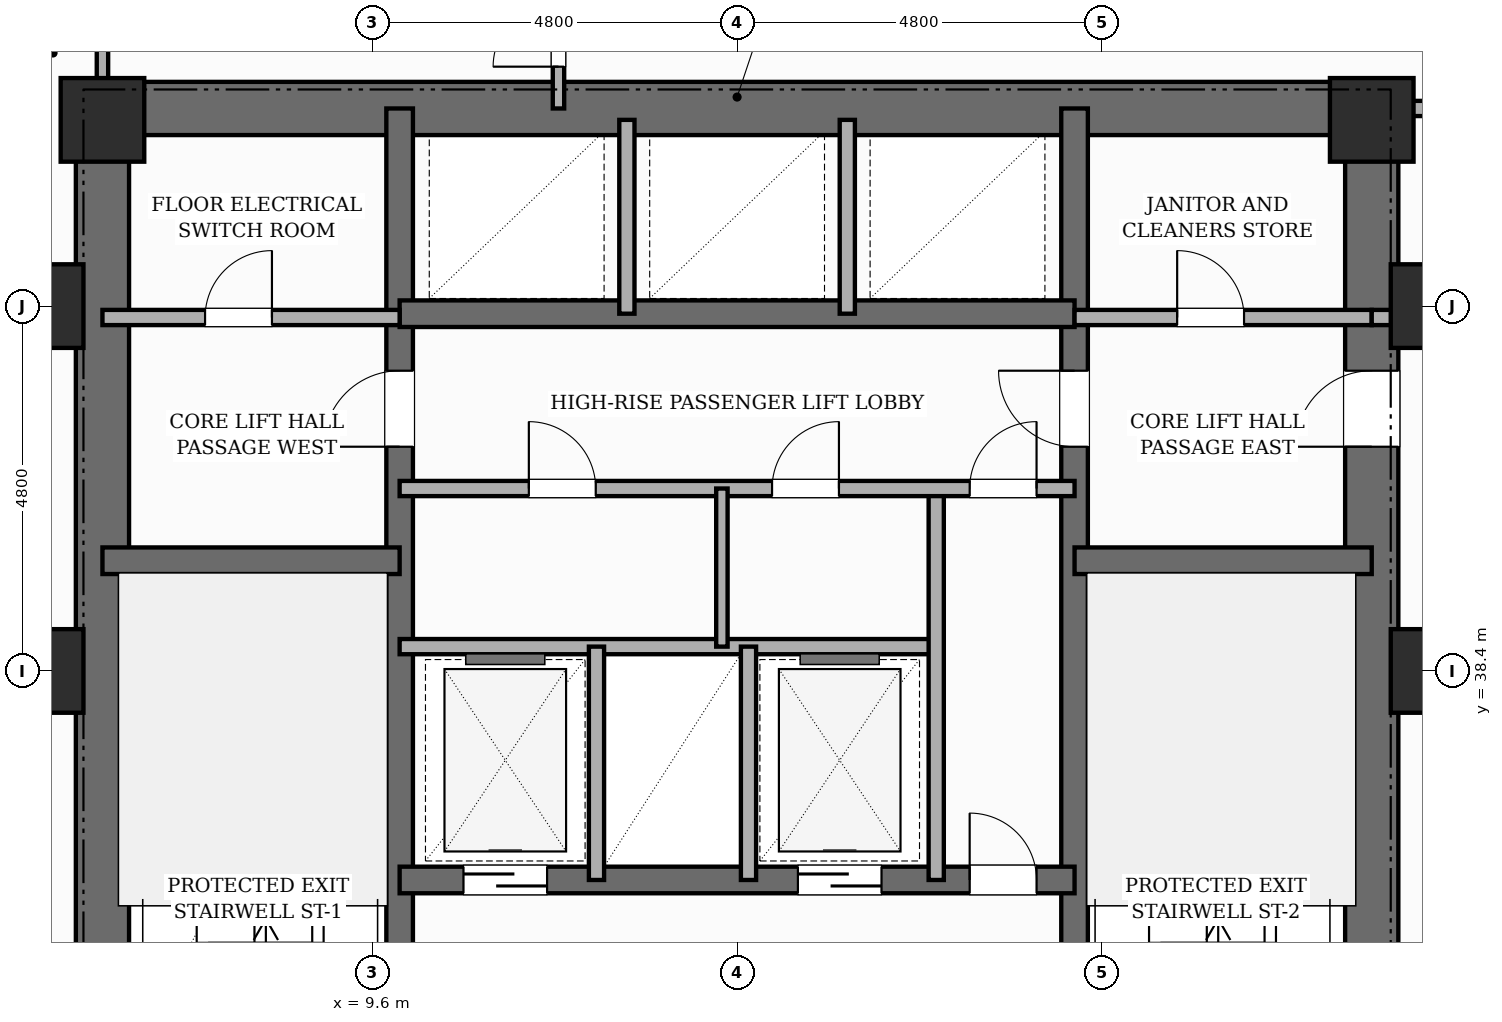
"""IFC4 building model, lengths in metres.
Left out: names, types, materials, properties, quantities, classifications, styles, units other than length and angle.
Written with IfcOpenShell. Run it as: python <this file> out.ifc"""

import sys

from ifc_helpers import new_model, si_unit, direction, frame, frame_2d, origin, origin_2d, place, context, subcontext, project, spatial, rectangle, extrude, element, fill, save


model = new_model("IFC4")
c1 = context("Model", 3, precision=1e-05, world=origin(), true_north=direction((0.0, 1.0)))
c2 = subcontext(c1, "Body", "Model", "MODEL_VIEW")
j1 = project(units=[si_unit("LENGTHUNIT", "METRE"), si_unit("PLANEANGLEUNIT", "RADIAN")], contexts=[c1])
p1 = place(None, origin())
s1 = spatial("IfcSite", under=j1, at=p1, CompositionType="ELEMENT")
p2 = place(p1, origin())
s2 = spatial("IfcBuilding", under=s1, at=p2, CompositionType="ELEMENT")
p3 = place(p2, frame((0.0, 0.0, 35.8)))
s3 = spatial("IfcBuildingStorey", under=s2, at=p3, CompositionType="ELEMENT", Elevation=35.8)
p4 = place(p3, frame((6.05, 30.55, 0.0), z_axis=(0.0, 0.0, 1.0), x_axis=(0.0, 1.0, 0.0)))
e1 = element("IfcWall", 1, at=p4, inside=s3, PredefinedType="SHEAR", context=c2, shape_type="SweptSolid", body=[
    extrude(rectangle(XDim=15.6, YDim=0.7, at=frame_2d((7.8, 0.0))), origin(), (0.0, 0.0, 1.0), 3.6),
])
p5 = place(p3, frame((22.75, 30.55, 0.0), z_axis=(0.0, 0.0, 1.0), x_axis=(0.0, 1.0, 0.0)))
e2 = element("IfcWall", 2, at=p5, inside=s3, PredefinedType="SHEAR", context=c2, shape_type="SweptSolid", body=[
    extrude(rectangle(XDim=15.6, YDim=0.7, at=frame_2d((7.8, 0.0))), origin(), (0.0, 0.0, 1.0), 3.6),
])
p6 = place(p5, frame((10.8, 0.0, 0.0)))
e3 = element("IfcOpeningElement", 3, at=p6, cuts=e2, PredefinedType="OPENING", context=c2, shape_type="SweptSolid", body=[
    extrude(rectangle(XDim=1.0, YDim=2.15, at=frame_2d((0.5, 1.075))), frame((0.0, 0.36, 0.0), z_axis=(0.0, -1.0, 0.0), x_axis=(1.0, 0.0, 0.0)), (0.0, 0.0, 1.0), 0.72),
])
p7 = place(p3, frame((6.05, 45.8, 0.0), z_axis=(0.0, 0.0, 1.0), x_axis=(1.0, 0.0, 0.0)))
e4 = element("IfcWall", 4, at=p7, inside=s3, PredefinedType="SHEAR", context=c2, shape_type="SweptSolid", body=[
    extrude(rectangle(XDim=16.7, YDim=0.7, at=frame_2d((8.35, 0.0))), origin(), (0.0, 0.0, 1.0), 3.6),
])
p8 = place(p3, frame((9.96, 30.9, 0.0), z_axis=(0.0, 0.0, 1.0), x_axis=(0.0, 1.0, 0.0)))
e5 = element("IfcWall", 5, at=p8, inside=s3, PredefinedType="SHEAR", context=c2, shape_type="SweptSolid", body=[
    extrude(rectangle(XDim=14.9, YDim=0.35, at=frame_2d((7.45, 0.0))), origin(), (0.0, 0.0, 1.0), 3.6),
])
p9 = place(p8, frame((0.65, 0.0, 0.0)))
e6 = element("IfcOpeningElement", 6, at=p9, cuts=e5, PredefinedType="OPENING", context=c2, shape_type="SweptSolid", body=[
    extrude(rectangle(XDim=0.95, YDim=2.1, at=frame_2d((0.475, 1.05))), frame((0.0, 0.185, 0.0), z_axis=(0.0, -1.0, 0.0), x_axis=(1.0, 0.0, 0.0)), (0.0, 0.0, 1.0), 0.37),
])
p10 = place(p8, frame((10.45, 0.0, 0.0)))
e7 = element("IfcOpeningElement", 7, at=p10, cuts=e5, PredefinedType="OPENING", context=c2, shape_type="SweptSolid", body=[
    extrude(rectangle(XDim=1.0, YDim=2.15, at=frame_2d((0.5, 1.075))), frame((0.0, 0.185, 0.0), z_axis=(0.0, -1.0, 0.0), x_axis=(1.0, 0.0, 0.0)), (0.0, 0.0, 1.0), 0.37),
])
p11 = place(p3, frame((18.84, 30.9, 0.0), z_axis=(0.0, 0.0, 1.0), x_axis=(0.0, 1.0, 0.0)))
e8 = element("IfcWall", 8, at=p11, inside=s3, PredefinedType="SHEAR", context=c2, shape_type="SweptSolid", body=[
    extrude(rectangle(XDim=14.9, YDim=0.35, at=frame_2d((7.45, 0.0))), origin(), (0.0, 0.0, 1.0), 3.6),
])
p12 = place(p11, frame((0.65, 0.0, 0.0)))
e9 = element("IfcOpeningElement", 9, at=p12, cuts=e8, PredefinedType="OPENING", context=c2, shape_type="SweptSolid", body=[
    extrude(rectangle(XDim=0.95, YDim=2.1, at=frame_2d((0.475, 1.05))), frame((0.0, 0.185, 0.0), z_axis=(0.0, -1.0, 0.0), x_axis=(1.0, 0.0, 0.0)), (0.0, 0.0, 1.0), 0.37),
])
p13 = place(p11, frame((10.45, 0.0, 0.0)))
e10 = element("IfcOpeningElement", 10, at=p13, cuts=e8, PredefinedType="OPENING", context=c2, shape_type="SweptSolid", body=[
    extrude(rectangle(XDim=1.0, YDim=2.15, at=frame_2d((0.5, 1.075))), frame((0.0, 0.185, 0.0), z_axis=(0.0, -1.0, 0.0), x_axis=(1.0, 0.0, 0.0)), (0.0, 0.0, 1.0), 0.37),
])
for number, where, z_axis, x_axis in (
    (11, (6.05, 39.85, 0.0), (0.0, 0.0, 1.0), (1.0, 0.0, 0.0)),
    (12, (18.84, 39.85, 0.0), (0.0, 0.0, 1.0), (1.0, 0.0, 0.0)),
):
    element("IfcWall", number, at=place(p3, frame(where, z_axis=z_axis, x_axis=x_axis)), inside=s3, PredefinedType="SHEAR", context=c2, shape_type="SweptSolid", body=[
        extrude(rectangle(XDim=3.91, YDim=0.35, at=frame_2d((1.955, 0.0))), origin(), (0.0, 0.0, 1.0), 3.6),
    ])
p14 = place(p3, frame((9.96, 35.65, 0.0), z_axis=(0.0, 0.0, 1.0), x_axis=(1.0, 0.0, 0.0)))
e13 = element("IfcWall", 13, at=p14, inside=s3, PredefinedType="SHEAR", context=c2, shape_type="SweptSolid", body=[
    extrude(rectangle(XDim=8.88, YDim=0.35, at=frame_2d((4.44, 0.0))), origin(), (0.0, 0.0, 1.0), 3.6),
])
p15 = place(p14, frame((0.84, 0.0, 0.0)))
e14 = element("IfcOpeningElement", 14, at=p15, cuts=e13, PredefinedType="OPENING", context=c2, shape_type="SweptSolid", body=[
    extrude(rectangle(XDim=1.1, YDim=2.15, at=frame_2d((0.55, 1.075))), frame((0.0, 0.185, 0.0), z_axis=(0.0, -1.0, 0.0), x_axis=(1.0, 0.0, 0.0)), (0.0, 0.0, 1.0), 0.37),
])
p16 = place(p14, frame((5.24, 0.0, 0.0)))
e15 = element("IfcOpeningElement", 15, at=p16, cuts=e13, PredefinedType="OPENING", context=c2, shape_type="SweptSolid", body=[
    extrude(rectangle(XDim=1.1, YDim=2.15, at=frame_2d((0.55, 1.075))), frame((0.0, 0.185, 0.0), z_axis=(0.0, -1.0, 0.0), x_axis=(1.0, 0.0, 0.0)), (0.0, 0.0, 1.0), 0.37),
])
p17 = place(p14, frame((7.5, 0.0, 0.0)))
e16 = element("IfcOpeningElement", 16, at=p17, cuts=e13, PredefinedType="OPENING", context=c2, shape_type="SweptSolid", body=[
    extrude(rectangle(XDim=0.88, YDim=2.1, at=frame_2d((0.44, 1.05))), frame((0.0, 0.185, 0.0), z_axis=(0.0, -1.0, 0.0), x_axis=(1.0, 0.0, 0.0)), (0.0, 0.0, 1.0), 0.37),
])
p18 = place(p3, frame((9.96, 43.1, 0.0), z_axis=(0.0, 0.0, 1.0), x_axis=(1.0, 0.0, 0.0)))
e17 = element("IfcWall", 17, at=p18, inside=s3, PredefinedType="SHEAR", context=c2, shape_type="SweptSolid", body=[
    extrude(rectangle(XDim=8.88, YDim=0.35, at=frame_2d((4.44, 0.0))), origin(), (0.0, 0.0, 1.0), 3.6),
])
for number, where, z_axis, x_axis in (
    (18, (5.25, 38.4, 0.0), (0.0, 0.0, 1.0), (1.0, 0.0, 0.0)),
    (19, (5.25, 43.2, 0.0), (0.0, 0.0, 1.0), (1.0, 0.0, 0.0)),
    (20, (6.05, 45.65, 0.0), (0.0, 0.0, 1.0), (1.0, 0.0, 0.0)),
    (21, (22.75, 45.65, 0.0), (0.0, 0.0, 1.0), (1.0, 0.0, 0.0)),
    (22, (23.55, 38.4, 0.0), (0.0, 0.0, 1.0), (1.0, 0.0, 0.0)),
    (23, (23.55, 43.2, 0.0), (0.0, 0.0, 1.0), (1.0, 0.0, 0.0)),
):
    element("IfcColumn", number, at=place(p3, frame(where, z_axis=z_axis, x_axis=x_axis)), inside=s3, PredefinedType="COLUMN", context=c2, shape_type="SweptSolid", body=[
        extrude(rectangle(XDim=1.1, YDim=1.1, at=origin_2d()), origin(), (0.0, 0.0, 1.0), 3.6),
    ])
p19 = place(p3, frame((5.03, 46.16, 0.0), z_axis=(0.0, 0.0, 1.0), x_axis=(0.382650053678, 0.92389335771, 0.0)))
e24 = element("IfcWall", 24, at=p19, inside=s3, PredefinedType="STANDARD", context=c2, shape_type="SweptSolid", body=[
    extrude(rectangle(XDim=0.626, YDim=0.32, at=frame_2d((0.313, 0.0))), origin(), (0.0, 0.0, 1.0), 3.35),
])
p20 = place(p3, frame((9.96, 38.72, 0.0), z_axis=(0.0, 0.0, 1.0), x_axis=(1.0, 0.0, 0.0)))
e25 = element("IfcWall", 25, at=p20, inside=s3, PredefinedType="POLYGONAL", context=c2, shape_type="SweptSolid", body=[
    extrude(rectangle(XDim=7.06, YDim=0.2, at=frame_2d((3.53, 0.0))), origin(), (0.0, 0.0, 1.0), 3.35),
])
for number, where, z_axis, x_axis in (
    (26, (12.55, 35.65, 0.0), (0.0, 0.0, 1.0), (0.0, 1.0, 0.0)),
    (27, (14.55, 35.65, 0.0), (0.0, 0.0, 1.0), (0.0, 1.0, 0.0)),
):
    element("IfcWall", number, at=place(p3, frame(where, z_axis=z_axis, x_axis=x_axis)), inside=s3, PredefinedType="POLYGONAL", context=c2, shape_type="SweptSolid", body=[
        extrude(rectangle(XDim=3.07, YDim=0.2, at=frame_2d((1.535, 0.0))), origin(), (0.0, 0.0, 1.0), 3.35),
    ])
p21 = place(p3, frame((17.02, 35.65, 0.0), z_axis=(0.0, 0.0, 1.0), x_axis=(0.0, 1.0, 0.0)))
e28 = element("IfcWall", 28, at=p21, inside=s3, PredefinedType="POLYGONAL", context=c2, shape_type="SweptSolid", body=[
    extrude(rectangle(XDim=5.15, YDim=0.2, at=frame_2d((2.575, 0.0))), origin(), (0.0, 0.0, 1.0), 3.35),
])
p22 = place(p3, frame((9.96, 40.8, 0.0), z_axis=(0.0, 0.0, 1.0), x_axis=(1.0, 0.0, 0.0)))
e29 = element("IfcWall", 29, at=p22, inside=s3, PredefinedType="POLYGONAL", context=c2, shape_type="SweptSolid", body=[
    extrude(rectangle(XDim=8.88, YDim=0.2, at=frame_2d((4.44, 0.0))), origin(), (0.0, 0.0, 1.0), 3.35),
])
p23 = place(p22, frame((7.5, 0.0, 0.0)))
e30 = element("IfcOpeningElement", 30, at=p23, cuts=e29, PredefinedType="OPENING", context=c2, shape_type="SweptSolid", body=[
    extrude(rectangle(XDim=0.88, YDim=2.1, at=frame_2d((0.44, 1.05))), frame((0.0, 0.11, 0.0), z_axis=(0.0, -1.0, 0.0), x_axis=(1.0, 0.0, 0.0)), (0.0, 0.0, 1.0), 0.22),
])
p24 = place(p22, frame((1.7, 0.0, 0.0)))
e31 = element("IfcOpeningElement", 31, at=p24, cuts=e29, PredefinedType="OPENING", context=c2, shape_type="SweptSolid", body=[
    extrude(rectangle(XDim=0.88, YDim=2.1, at=frame_2d((0.44, 1.05))), frame((0.0, 0.11, 0.0), z_axis=(0.0, -1.0, 0.0), x_axis=(1.0, 0.0, 0.0)), (0.0, 0.0, 1.0), 0.22),
])
p25 = place(p22, frame((4.9, 0.0, 0.0)))
e32 = element("IfcOpeningElement", 32, at=p25, cuts=e29, PredefinedType="OPENING", context=c2, shape_type="SweptSolid", body=[
    extrude(rectangle(XDim=0.88, YDim=2.1, at=frame_2d((0.44, 1.05))), frame((0.0, 0.11, 0.0), z_axis=(0.0, -1.0, 0.0), x_axis=(1.0, 0.0, 0.0)), (0.0, 0.0, 1.0), 0.22),
])
p26 = place(p3, frame((18.84, 43.05, 0.0), z_axis=(0.0, 0.0, 1.0), x_axis=(1.0, 0.0, 0.0)))
e33 = element("IfcWall", 33, at=p26, inside=s3, PredefinedType="POLYGONAL", context=c2, shape_type="SweptSolid", body=[
    extrude(rectangle(XDim=3.91, YDim=0.2, at=frame_2d((1.955, 0.0))), origin(), (0.0, 0.0, 1.0), 2.53),
])
p27 = place(p26, frame((1.35, 0.0, 0.0)))
e34 = element("IfcOpeningElement", 34, at=p27, cuts=e33, PredefinedType="OPENING", context=c2, shape_type="SweptSolid", body=[
    extrude(rectangle(XDim=0.88, YDim=2.1, at=frame_2d((0.44, 1.05))), frame((0.0, 0.11, 0.0), z_axis=(0.0, -1.0, 0.0), x_axis=(1.0, 0.0, 0.0)), (0.0, 0.0, 1.0), 0.22),
])
p28 = place(p3, frame((6.05, 43.05, 0.0), z_axis=(0.0, 0.0, 1.0), x_axis=(1.0, 0.0, 0.0)))
e35 = element("IfcWall", 35, at=p28, inside=s3, PredefinedType="POLYGONAL", context=c2, shape_type="SweptSolid", body=[
    extrude(rectangle(XDim=3.91, YDim=0.2, at=frame_2d((1.955, 0.0))), origin(), (0.0, 0.0, 1.0), 2.53),
])
p29 = place(p28, frame((1.35, 0.0, 0.0)))
e36 = element("IfcOpeningElement", 36, at=p29, cuts=e35, PredefinedType="OPENING", context=c2, shape_type="SweptSolid", body=[
    extrude(rectangle(XDim=0.88, YDim=2.1, at=frame_2d((0.44, 1.05))), frame((0.0, 0.11, 0.0), z_axis=(0.0, -1.0, 0.0), x_axis=(1.0, 0.0, 0.0)), (0.0, 0.0, 1.0), 0.22),
])
for number, where, z_axis, x_axis in (
    (37, (12.95, 43.1, 0.0), (0.0, 0.0, 1.0), (0.0, 1.0, 0.0)),
    (38, (15.85, 43.1, 0.0), (0.0, 0.0, 1.0), (0.0, 1.0, 0.0)),
):
    element("IfcWall", number, at=place(p3, frame(where, z_axis=z_axis, x_axis=x_axis)), inside=s3, PredefinedType="POLYGONAL", context=c2, shape_type="SweptSolid", body=[
        extrude(rectangle(XDim=2.55, YDim=0.2, at=frame_2d((1.275, 0.0))), origin(), (0.0, 0.0, 1.0), 3.35),
    ])
p30 = place(p3, frame((14.2, 38.72, 0.0), z_axis=(0.0, 0.0, 1.0), x_axis=(0.0, 1.0, 0.0)))
e39 = element("IfcWall", 39, at=p30, inside=s3, PredefinedType="PARTITIONING", context=c2, shape_type="SweptSolid", body=[
    extrude(rectangle(XDim=2.08, YDim=0.15, at=frame_2d((1.04, 0.0))), origin(), (0.0, 0.0, 1.0), 3.35),
])
p31 = place(p3, frame((22.75, 45.8, 0.0), z_axis=(0.0, 0.0, 1.0), x_axis=(1.0, 0.0, 0.0)))
e40 = element("IfcWall", 40, at=p31, inside=s3, PredefinedType="PARTITIONING", context=c2, shape_type="SweptSolid", body=[
    extrude(rectangle(XDim=2.75, YDim=0.2, at=frame_2d((1.375, 0.0))), origin(), (0.0, 0.0, 1.0), 3.35),
])
p32 = place(p3, frame((6.05, 45.8, 0.0), z_axis=(0.0, 0.0, 1.0), x_axis=(0.0, 1.0, 0.0)))
e41 = element("IfcWall", 41, at=p32, inside=s3, PredefinedType="PARTITIONING", context=c2, shape_type="SweptSolid", body=[
    extrude(rectangle(XDim=1.46, YDim=0.15, at=frame_2d((0.73, 0.0))), origin(), (0.0, 0.0, 1.0), 3.35),
])
p33 = place(p3, frame((12.05, 45.8, 0.0), z_axis=(0.0, 0.0, 1.0), x_axis=(0.0, 1.0, 0.0)))
e42 = element("IfcWall", 42, at=p33, inside=s3, PredefinedType="PARTITIONING", context=c2, shape_type="SweptSolid", body=[
    extrude(rectangle(XDim=1.88, YDim=0.15, at=frame_2d((0.94, 0.0))), origin(), (0.0, 0.0, 1.0), 3.35),
])
p34 = place(p33, frame((0.55, 0.0, 0.0)))
e43 = element("IfcOpeningElement", 43, at=p34, cuts=e42, PredefinedType="OPENING", context=c2, shape_type="SweptSolid", body=[
    extrude(rectangle(XDim=0.86, YDim=2.1, at=frame_2d((0.43, 1.05))), frame((0.0, 0.085, 0.0), z_axis=(0.0, -1.0, 0.0), x_axis=(1.0, 0.0, 0.0)), (0.0, 0.0, 1.0), 0.17),
])
p35 = place(p3, frame((22.75, 43.05, 0.0), z_axis=(0.0, 0.0, 1.0), x_axis=(1.0, 0.0, 0.0)))
e44 = element("IfcWall", 44, at=p35, inside=s3, PredefinedType="PARTITIONING", context=c2, shape_type="SweptSolid", body=[
    extrude(rectangle(XDim=2.75, YDim=0.2, at=frame_2d((1.375, 0.0))), origin(), (0.0, 0.0, 1.0), 2.53),
])
p36 = place(p15, origin())
e45 = element("IfcDoor", 45, at=p36, inside=s3, OperationType="SLIDING_TO_LEFT", PredefinedType="DOOR", context=c2, shape_type="SweptSolid", body=[
    extrude(rectangle(XDim=1.1, YDim=2.15, at=frame_2d((0.55, 1.075))), frame((0.0, 0.025, 0.0), z_axis=(0.0, -1.0, 0.0), x_axis=(1.0, 0.0, 0.0)), (0.0, 0.0, 1.0), 0.05),
])
fill(e14, e45)
p37 = place(p16, origin())
e46 = element("IfcDoor", 46, at=p37, inside=s3, OperationType="SLIDING_TO_RIGHT", PredefinedType="DOOR", context=c2, shape_type="SweptSolid", body=[
    extrude(rectangle(XDim=1.1, YDim=2.15, at=frame_2d((0.55, 1.075))), frame((0.0, 0.025, 0.0), z_axis=(0.0, -1.0, 0.0), x_axis=(1.0, 0.0, 0.0)), (0.0, 0.0, 1.0), 0.05),
])
fill(e15, e46)
p38 = place(p17, origin())
e47 = element("IfcDoor", 47, at=p38, inside=s3, OperationType="SINGLE_SWING_LEFT", PredefinedType="DOOR", context=c2, shape_type="SweptSolid", body=[
    extrude(rectangle(XDim=0.88, YDim=2.1, at=frame_2d((0.44, 1.05))), frame((0.0, 0.025, 0.0), z_axis=(0.0, -1.0, 0.0), x_axis=(1.0, 0.0, 0.0)), (0.0, 0.0, 1.0), 0.05),
])
fill(e16, e47)
p39 = place(p23, origin())
e48 = element("IfcDoor", 48, at=p39, inside=s3, OperationType="SINGLE_SWING_RIGHT", PredefinedType="DOOR", context=c2, shape_type="SweptSolid", body=[
    extrude(rectangle(XDim=0.88, YDim=2.1, at=frame_2d((0.44, 1.05))), frame((0.0, 0.025, 0.0), z_axis=(0.0, -1.0, 0.0), x_axis=(1.0, 0.0, 0.0)), (0.0, 0.0, 1.0), 0.05),
])
fill(e30, e48)
p40 = place(p10, origin())
e49 = element("IfcDoor", 49, at=p40, inside=s3, OperationType="SINGLE_SWING_LEFT", PredefinedType="DOOR", context=c2, shape_type="SweptSolid", body=[
    extrude(rectangle(XDim=1.0, YDim=2.15, at=frame_2d((0.5, 1.075))), frame((0.0, 0.025, 0.0), z_axis=(0.0, -1.0, 0.0), x_axis=(1.0, 0.0, 0.0)), (0.0, 0.0, 1.0), 0.05),
])
fill(e7, e49)
p41 = place(p13, origin())
e50 = element("IfcDoor", 50, at=p41, inside=s3, OperationType="SINGLE_SWING_RIGHT", PredefinedType="DOOR", context=c2, shape_type="SweptSolid", body=[
    extrude(rectangle(XDim=1.0, YDim=2.15, at=frame_2d((0.5, 1.075))), frame((0.0, 0.025, 0.0), z_axis=(0.0, -1.0, 0.0), x_axis=(1.0, 0.0, 0.0)), (0.0, 0.0, 1.0), 0.05),
])
fill(e10, e50)
p42 = place(p6, origin())
e51 = element("IfcDoor", 51, at=p42, inside=s3, OperationType="SINGLE_SWING_LEFT", PredefinedType="DOOR", context=c2, shape_type="SweptSolid", body=[
    extrude(rectangle(XDim=1.0, YDim=2.15, at=frame_2d((0.5, 1.075))), frame((0.0, 0.025, 0.0), z_axis=(0.0, -1.0, 0.0), x_axis=(1.0, 0.0, 0.0)), (0.0, 0.0, 1.0), 0.05),
])
fill(e3, e51)
p43 = place(p29, origin())
e52 = element("IfcDoor", 52, at=p43, inside=s3, OperationType="SINGLE_SWING_RIGHT", PredefinedType="DOOR", context=c2, shape_type="SweptSolid", body=[
    extrude(rectangle(XDim=0.88, YDim=2.1, at=frame_2d((0.44, 1.05))), frame((0.0, 0.025, 0.0), z_axis=(0.0, -1.0, 0.0), x_axis=(1.0, 0.0, 0.0)), (0.0, 0.0, 1.0), 0.05),
])
fill(e36, e52)
p44 = place(p24, origin())
e53 = element("IfcDoor", 53, at=p44, inside=s3, OperationType="SINGLE_SWING_LEFT", PredefinedType="DOOR", context=c2, shape_type="SweptSolid", body=[
    extrude(rectangle(XDim=0.88, YDim=2.1, at=frame_2d((0.44, 1.05))), frame((0.0, 0.025, 0.0), z_axis=(0.0, -1.0, 0.0), x_axis=(1.0, 0.0, 0.0)), (0.0, 0.0, 1.0), 0.05),
])
fill(e31, e53)
p45 = place(p25, origin())
e54 = element("IfcDoor", 54, at=p45, inside=s3, OperationType="SINGLE_SWING_RIGHT", PredefinedType="DOOR", context=c2, shape_type="SweptSolid", body=[
    extrude(rectangle(XDim=0.88, YDim=2.1, at=frame_2d((0.44, 1.05))), frame((0.0, 0.025, 0.0), z_axis=(0.0, -1.0, 0.0), x_axis=(1.0, 0.0, 0.0)), (0.0, 0.0, 1.0), 0.05),
])
fill(e32, e54)
p46 = place(p27, origin())
e55 = element("IfcDoor", 55, at=p46, inside=s3, OperationType="SINGLE_SWING_LEFT", PredefinedType="DOOR", context=c2, shape_type="SweptSolid", body=[
    extrude(rectangle(XDim=0.88, YDim=2.1, at=frame_2d((0.44, 1.05))), frame((0.0, 0.025, 0.0), z_axis=(0.0, -1.0, 0.0), x_axis=(1.0, 0.0, 0.0)), (0.0, 0.0, 1.0), 0.05),
])
fill(e34, e55)
p47 = place(p34, origin())
e56 = element("IfcDoor", 56, at=p47, inside=s3, OperationType="SINGLE_SWING_LEFT", PredefinedType="DOOR", context=c2, shape_type="SweptSolid", body=[
    extrude(rectangle(XDim=0.86, YDim=2.1, at=frame_2d((0.43, 1.05))), frame((0.0, 0.025, 0.0), z_axis=(0.0, -1.0, 0.0), x_axis=(1.0, 0.0, 0.0)), (0.0, 0.0, 1.0), 0.05),
])
fill(e43, e56)
save(model, sys.argv[1])
